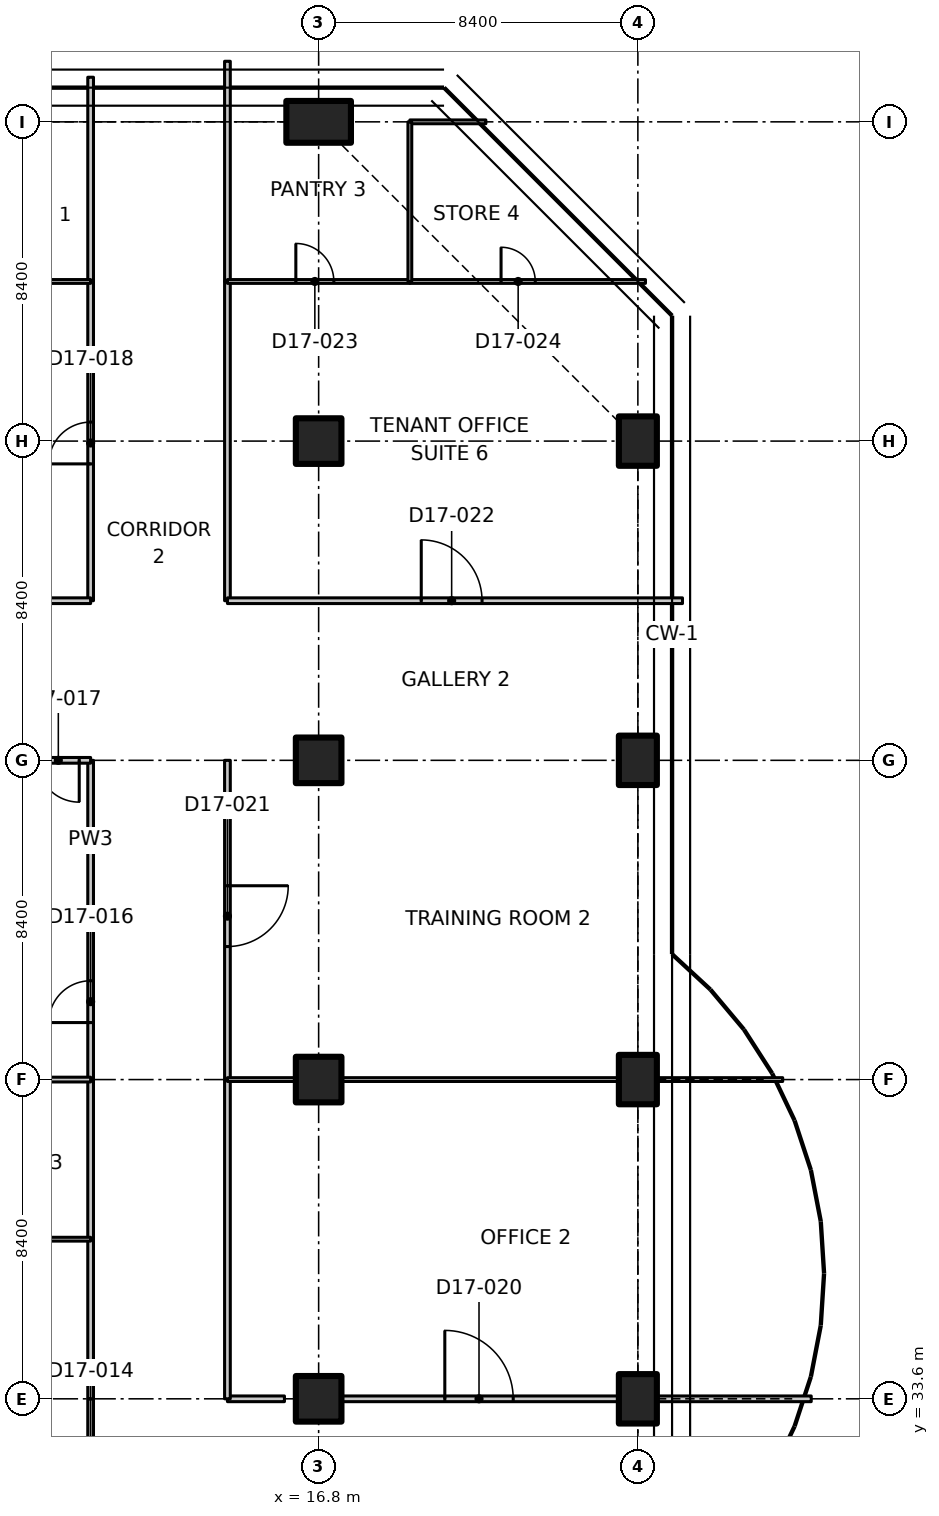
"""IFC4 building model, lengths in metres.
Left out: names, types, materials, properties, quantities, classifications, styles, units other than length and angle.
Written with IfcOpenShell. Run it as: python <this file> out.ifc"""

import sys

from ifc_helpers import new_model, si_unit, direction, frame, frame_2d, origin, origin_2d, place, context, subcontext, project, spatial, polyline, rectangle, outline, extrude, element, fill, save


model = new_model("IFC4")
c1 = context("Model", 3, precision=1e-05, world=origin(), true_north=direction((0.0, 1.0)))
c2 = subcontext(c1, "Body", "Model", "MODEL_VIEW")
j1 = project(units=[si_unit("LENGTHUNIT", "METRE"), si_unit("PLANEANGLEUNIT", "RADIAN")], contexts=[c1])
p1 = place(None, origin())
s1 = spatial("IfcSite", under=j1, at=p1, CompositionType="ELEMENT")
p2 = place(p1, origin())
s2 = spatial("IfcBuilding", under=s1, at=p2, CompositionType="ELEMENT")
p3 = place(p2, frame((0.0, 0.0, 138.5)))
s3 = spatial("IfcBuildingStorey", under=s2, at=p3, CompositionType="ELEMENT", Elevation=138.5)
for number, where, z_axis, x_axis in (
    (1, (16.8, 33.6, 0.0), (0.0, 0.0, 1.0), (1.0, 0.0, 0.0)),
    (2, (16.8, 42.0, 0.0), (0.0, 0.0, 1.0), (1.0, 0.0, 0.0)),
    (3, (16.8, 50.4, 0.0), (0.0, 0.0, 1.0), (1.0, 0.0, 0.0)),
    (4, (16.8, 58.8, 0.0), (0.0, 0.0, 1.0), (1.0, 0.0, 0.0)),
):
    element("IfcColumn", number, at=place(p3, frame(where, z_axis=z_axis, x_axis=x_axis)), inside=s3, PredefinedType="COLUMN", context=c2, shape_type="SweptSolid", body=[
        extrude(rectangle(XDim=1.2, YDim=1.2, at=origin_2d()), origin(), (0.0, 0.0, 1.0), 3.35),
    ])
p4 = place(p3, frame((16.8, 67.2, 0.0), z_axis=(0.0, 0.0, 1.0), x_axis=(0.0, 1.0, 0.0)))
e5 = element("IfcColumn", 5, at=p4, inside=s3, PredefinedType="COLUMN", context=c2, shape_type="SweptSolid", body=[
    extrude(rectangle(XDim=1.1, YDim=1.7, at=origin_2d()), origin(), (0.0, 0.0, 1.0), 3.35),
])
for number, where, z_axis, x_axis in (
    (6, (25.2, 33.6, 0.0), (0.0, 0.0, 1.0), (1.0, 0.0, 0.0)),
    (7, (25.2, 42.0, 0.0), (0.0, 0.0, 1.0), (1.0, 0.0, 0.0)),
    (8, (25.2, 50.4, 0.0), (0.0, 0.0, 1.0), (1.0, 0.0, 0.0)),
    (9, (25.2, 58.8, 0.0), (0.0, 0.0, 1.0), (1.0, 0.0, 0.0)),
):
    element("IfcColumn", number, at=place(p3, frame(where, z_axis=z_axis, x_axis=x_axis)), inside=s3, PredefinedType="COLUMN", context=c2, shape_type="SweptSolid", body=[
        extrude(rectangle(XDim=1.0, YDim=1.3, at=origin_2d()), origin(), (0.0, 0.0, 1.0), 3.35),
    ])
p5 = place(p3, frame((10.8, 29.4, 0.0), z_axis=(0.0, 0.0, 1.0), x_axis=(0.0, 1.0, 0.0)))
e10 = element("IfcWall", 10, at=p5, inside=s3, PredefinedType="PARTITIONING", context=c2, shape_type="SweptSolid", body=[
    extrude(rectangle(XDim=4.2, YDim=0.15, at=frame_2d((2.1, 0.0))), origin(), (0.0, 0.0, 1.0), 3.33),
])
p6 = place(p5, frame((1.2, 0.0, 0.0)))
e11 = element("IfcOpeningElement", 11, at=p6, cuts=e10, PredefinedType="OPENING", context=c2, shape_type="SweptSolid", body=[
    extrude(rectangle(XDim=1.6, YDim=2.1, at=frame_2d((0.8, 1.05))), frame((0.0, 0.085, 0.0), z_axis=(0.0, -1.0, 0.0), x_axis=(1.0, 0.0, 0.0)), (0.0, 0.0, 1.0), 0.17),
])
p7 = place(p3, frame((14.4, 33.6, 0.0), z_axis=(0.0, 0.0, 1.0), x_axis=(1.0, 0.0, 0.0)))
e12 = element("IfcWall", 12, at=p7, inside=s3, PredefinedType="PARTITIONING", context=c2, shape_type="SweptSolid", body=[
    extrude(rectangle(XDim=1.5, YDim=0.15, at=frame_2d((0.75, 0.0))), origin(), (0.0, 0.0, 1.0), 3.33),
])
p8 = place(p3, frame((17.42, 33.6, 0.0), z_axis=(0.0, 0.0, 1.0), x_axis=(1.0, 0.0, 0.0)))
e13 = element("IfcWall", 13, at=p8, inside=s3, PredefinedType="PARTITIONING", context=c2, shape_type="SweptSolid", body=[
    extrude(rectangle(XDim=7.26, YDim=0.15, at=frame_2d((3.63, 0.0))), origin(), (0.0, 0.0, 1.0), 3.33),
])
p9 = place(p8, frame((2.7, 0.0, 0.0)))
e14 = element("IfcOpeningElement", 14, at=p9, cuts=e13, PredefinedType="OPENING", context=c2, shape_type="SweptSolid", body=[
    extrude(rectangle(XDim=1.8, YDim=2.1, at=frame_2d((0.9, 1.05))), frame((0.0, 0.085, 0.0), z_axis=(0.0, -1.0, 0.0), x_axis=(1.0, 0.0, 0.0)), (0.0, 0.0, 1.0), 0.17),
])
p10 = place(p3, frame((25.72, 33.6, 0.0), z_axis=(0.0, 0.0, 1.0), x_axis=(1.0, 0.0, 0.0)))
e15 = element("IfcWall", 15, at=p10, inside=s3, PredefinedType="PARTITIONING", context=c2, shape_type="SweptSolid", body=[
    extrude(rectangle(XDim=4.042, YDim=0.15, at=frame_2d((2.021, 0.0))), origin(), (0.0, 0.0, 1.0), 2.98),
])
for number, where, z_axis, x_axis in (
    (16, (10.8, 33.6, 0.0), (0.0, 0.0, 1.0), (0.0, 1.0, 0.0)),
    (17, (10.8, 37.8, 0.0), (0.0, 0.0, 1.0), (0.0, 1.0, 0.0)),
):
    element("IfcWall", number, at=place(p3, frame(where, z_axis=z_axis, x_axis=x_axis)), inside=s3, PredefinedType="PARTITIONING", context=c2, shape_type="SweptSolid", body=[
        extrude(rectangle(XDim=4.2, YDim=0.15, at=frame_2d((2.1, 0.0))), origin(), (0.0, 0.0, 1.0), 3.33),
    ])
p11 = place(p3, frame((10.8, 42.0, 0.0), z_axis=(0.0, 0.0, 1.0), x_axis=(0.0, 1.0, 0.0)))
e18 = element("IfcWall", 18, at=p11, inside=s3, PredefinedType="PARTITIONING", context=c2, shape_type="SweptSolid", body=[
    extrude(rectangle(XDim=4.2, YDim=0.15, at=frame_2d((2.1, 0.0))), origin(), (0.0, 0.0, 1.0), 3.33),
])
p12 = place(p11, frame((1.5, 0.0, 0.0)))
e19 = element("IfcOpeningElement", 19, at=p12, cuts=e18, PredefinedType="OPENING", context=c2, shape_type="SweptSolid", body=[
    extrude(rectangle(XDim=1.1, YDim=2.1, at=frame_2d((0.55, 1.05))), frame((0.0, 0.085, 0.0), z_axis=(0.0, -1.0, 0.0), x_axis=(1.0, 0.0, 0.0)), (0.0, 0.0, 1.0), 0.17),
])
p13 = place(p3, frame((10.8, 46.2, 0.0), z_axis=(0.0, 0.0, 1.0), x_axis=(0.0, 1.0, 0.0)))
e20 = element("IfcWall", 20, at=p13, inside=s3, PredefinedType="PARTITIONING", context=c2, shape_type="SweptSolid", body=[
    extrude(rectangle(XDim=4.2, YDim=0.15, at=frame_2d((2.1, 0.0))), origin(), (0.0, 0.0, 1.0), 3.33),
])
p14 = place(p3, frame((10.8, 54.6, 0.0), z_axis=(0.0, 0.0, 1.0), x_axis=(0.0, 1.0, 0.0)))
e21 = element("IfcWall", 21, at=p14, inside=s3, PredefinedType="PARTITIONING", context=c2, shape_type="SweptSolid", body=[
    extrude(rectangle(XDim=8.4, YDim=0.15, at=frame_2d((4.2, 0.0))), origin(), (0.0, 0.0, 1.0), 3.33),
])
p15 = place(p14, frame((3.6, 0.0, 0.0)))
e22 = element("IfcOpeningElement", 22, at=p15, cuts=e21, PredefinedType="OPENING", context=c2, shape_type="SweptSolid", body=[
    extrude(rectangle(XDim=1.1, YDim=2.1, at=frame_2d((0.55, 1.05))), frame((0.0, 0.085, 0.0), z_axis=(0.0, -1.0, 0.0), x_axis=(1.0, 0.0, 0.0)), (0.0, 0.0, 1.0), 0.17),
])
p16 = place(p3, frame((10.8, 63.0, 0.0), z_axis=(0.0, 0.0, 1.0), x_axis=(0.0, 1.0, 0.0)))
e23 = element("IfcWall", 23, at=p16, inside=s3, PredefinedType="PARTITIONING", context=c2, shape_type="SweptSolid", body=[
    extrude(outline(polyline([(0.0, 0.0), (5.374, 0.0), (5.374, 3.33), (5.28, 3.33), (4.65, 3.33), (4.648, 2.98), (3.752, 2.98), (3.75, 3.33), (0.0, 3.33), (0.0, 0.0)])), frame((0.0, 0.075, 0.0), z_axis=(0.0, -1.0, 0.0), x_axis=(1.0, 0.0, 0.0)), (0.0, 0.0, 1.0), 0.15),
])
p17 = place(p3, frame((14.4, 42.0, 0.0), z_axis=(0.0, 0.0, 1.0), x_axis=(0.0, -1.0, 0.0)))
e24 = element("IfcWall", 24, at=p17, inside=s3, PredefinedType="PARTITIONING", context=c2, shape_type="SweptSolid", body=[
    extrude(rectangle(XDim=8.4, YDim=0.15, at=frame_2d((4.2, 0.0))), origin(), (0.0, 0.0, 1.0), 3.33),
])
p18 = place(p3, frame((14.4, 50.4, 0.0), z_axis=(0.0, 0.0, 1.0), x_axis=(0.0, -1.0, 0.0)))
e25 = element("IfcWall", 25, at=p18, inside=s3, PredefinedType="PARTITIONING", context=c2, shape_type="SweptSolid", body=[
    extrude(rectangle(XDim=8.4, YDim=0.15, at=frame_2d((4.2, 0.0))), origin(), (0.0, 0.0, 1.0), 3.33),
])
p19 = place(p18, frame((3.3, 0.0, 0.0)))
e26 = element("IfcOpeningElement", 26, at=p19, cuts=e25, PredefinedType="OPENING", context=c2, shape_type="SweptSolid", body=[
    extrude(rectangle(XDim=1.6, YDim=2.1, at=frame_2d((0.8, 1.05))), frame((0.0, 0.085, 0.0), z_axis=(0.0, -1.0, 0.0), x_axis=(1.0, 0.0, 0.0)), (0.0, 0.0, 1.0), 0.17),
])
p20 = place(p3, frame((14.4, 63.0, 0.0), z_axis=(0.0, 0.0, 1.0), x_axis=(0.0, -1.0, 0.0)))
e27 = element("IfcWall", 27, at=p20, inside=s3, PredefinedType="PARTITIONING", context=c2, shape_type="SweptSolid", body=[
    extrude(rectangle(XDim=8.4, YDim=0.15, at=frame_2d((4.2, 0.0))), origin(), (0.0, 0.0, 1.0), 3.33),
])
p21 = place(p3, frame((14.4, 68.794, 0.0), z_axis=(0.0, 0.0, 1.0), x_axis=(0.0, -1.0, 0.0)))
e28 = element("IfcWall", 28, at=p21, inside=s3, PredefinedType="PARTITIONING", context=c2, shape_type="SweptSolid", body=[
    extrude(outline(polyline([(0.0, 0.0), (5.794, 0.0), (5.794, 3.33), (2.044, 3.33), (2.042, 2.98), (1.146, 2.98), (1.144, 3.33), (0.514, 3.33), (0.0, 3.33), (0.0, 0.0)])), frame((0.0, 0.075, 0.0), z_axis=(0.0, -1.0, 0.0), x_axis=(1.0, 0.0, 0.0)), (0.0, 0.0, 1.0), 0.15),
])
p22 = place(p3, frame((10.8, 50.4, 0.0), z_axis=(0.0, 0.0, 1.0), x_axis=(-1.0, 0.0, 0.0)))
e29 = element("IfcWall", 29, at=p22, inside=s3, PredefinedType="PARTITIONING", context=c2, shape_type="SweptSolid", body=[
    extrude(rectangle(XDim=1.88, YDim=0.15, at=frame_2d((0.94, 0.0))), origin(), (0.0, 0.0, 1.0), 3.33),
])
p23 = place(p22, frame((0.3, 0.0, 0.0)))
e30 = element("IfcOpeningElement", 30, at=p23, cuts=e29, PredefinedType="OPENING", context=c2, shape_type="SweptSolid", body=[
    extrude(rectangle(XDim=1.1, YDim=2.1, at=frame_2d((0.55, 1.05))), frame((0.0, 0.085, 0.0), z_axis=(0.0, -1.0, 0.0), x_axis=(1.0, 0.0, 0.0)), (0.0, 0.0, 1.0), 0.17),
])
p24 = place(p3, frame((7.035, 54.6, 0.0), z_axis=(0.0, 0.0, 1.0), x_axis=(1.0, 0.0, 0.0)))
e31 = element("IfcWall", 31, at=p24, inside=s3, PredefinedType="PARTITIONING", context=c2, shape_type="SweptSolid", body=[
    extrude(rectangle(XDim=3.765, YDim=0.15, at=frame_2d((1.883, 0.0))), origin(), (0.0, 0.0, 1.0), 2.98),
])
p25 = place(p3, frame((4.235, 37.8, 0.0), z_axis=(0.0, 0.0, 1.0), x_axis=(1.0, 0.0, 0.0)))
e32 = element("IfcWall", 32, at=p25, inside=s3, PredefinedType="PARTITIONING", context=c2, shape_type="SweptSolid", body=[
    extrude(outline(polyline([(0.0, 0.0), (6.565, 0.0), (6.565, 3.33), (1.815, 3.33), (1.813, 2.98), (0.917, 2.98), (0.915, 3.33), (0.265, 3.33), (0.0, 3.33), (0.0, 0.0)])), frame((0.0, 0.05, 0.0), z_axis=(0.0, -1.0, 0.0), x_axis=(1.0, 0.0, 0.0)), (0.0, 0.0, 1.0), 0.1),
])
p26 = place(p25, frame((2.865, 0.0, 0.0)))
e33 = element("IfcOpeningElement", 33, at=p26, cuts=e32, PredefinedType="OPENING", context=c2, shape_type="SweptSolid", body=[
    extrude(rectangle(XDim=1.0, YDim=2.1, at=frame_2d((0.5, 1.05))), frame((0.0, 0.06, 0.0), z_axis=(0.0, -1.0, 0.0), x_axis=(1.0, 0.0, 0.0)), (0.0, 0.0, 1.0), 0.12),
])
p27 = place(p3, frame((9.02, 42.0, 0.0), z_axis=(0.0, 0.0, 1.0), x_axis=(1.0, 0.0, 0.0)))
e34 = element("IfcWall", 34, at=p27, inside=s3, PredefinedType="PARTITIONING", context=c2, shape_type="SweptSolid", body=[
    extrude(rectangle(XDim=1.78, YDim=0.125, at=frame_2d((0.89, 0.0))), origin(), (0.0, 0.0, 1.0), 3.33),
])
p28 = place(p3, frame((4.235, 46.2, 0.0), z_axis=(0.0, 0.0, 1.0), x_axis=(1.0, 0.0, 0.0)))
e35 = element("IfcWall", 35, at=p28, inside=s3, PredefinedType="PARTITIONING", context=c2, shape_type="SweptSolid", body=[
    extrude(outline(polyline([(0.0, 0.0), (6.565, 0.0), (6.565, 3.33), (1.815, 3.33), (1.813, 2.98), (0.917, 2.98), (0.915, 3.33), (0.265, 3.33), (0.0, 3.33), (0.0, 0.0)])), frame((0.0, 0.05, 0.0), z_axis=(0.0, -1.0, 0.0), x_axis=(1.0, 0.0, 0.0)), (0.0, 0.0, 1.0), 0.1),
])
p29 = place(p3, frame((7.035, 63.0, 0.0), z_axis=(0.0, 0.0, 1.0), x_axis=(1.0, 0.0, 0.0)))
e36 = element("IfcWall", 36, at=p29, inside=s3, PredefinedType="PARTITIONING", context=c2, shape_type="SweptSolid", body=[
    extrude(rectangle(XDim=3.765, YDim=0.1, at=frame_2d((1.883, 0.0))), origin(), (0.0, 0.0, 1.0), 2.98),
])
p30 = place(p29, frame((1.665, 0.0, 0.0)))
e37 = element("IfcOpeningElement", 37, at=p30, cuts=e36, PredefinedType="OPENING", context=c2, shape_type="SweptSolid", body=[
    extrude(rectangle(XDim=0.9, YDim=2.1, at=frame_2d((0.45, 1.05))), frame((0.0, 0.06, 0.0), z_axis=(0.0, -1.0, 0.0), x_axis=(1.0, 0.0, 0.0)), (0.0, 0.0, 1.0), 0.12),
])
p31 = place(p3, frame((14.4, 54.6, 0.0), z_axis=(0.0, 0.0, 1.0), x_axis=(1.0, 0.0, 0.0)))
e38 = element("IfcWall", 38, at=p31, inside=s3, PredefinedType="PARTITIONING", context=c2, shape_type="SweptSolid", body=[
    extrude(outline(polyline([(0.0, 0.0), (11.974, 0.0), (11.974, 3.33), (11.9, 3.33), (11.25, 3.33), (11.248, 2.98), (10.352, 2.98), (10.35, 3.33), (0.0, 3.33), (0.0, 0.0)])), frame((0.0, 0.075, 0.0), z_axis=(0.0, -1.0, 0.0), x_axis=(1.0, 0.0, 0.0)), (0.0, 0.0, 1.0), 0.15),
])
p32 = place(p31, frame((5.1, 0.0, 0.0)))
e39 = element("IfcOpeningElement", 39, at=p32, cuts=e38, PredefinedType="OPENING", context=c2, shape_type="SweptSolid", body=[
    extrude(rectangle(XDim=1.6, YDim=2.1, at=frame_2d((0.8, 1.05))), frame((0.0, 0.085, 0.0), z_axis=(0.0, -1.0, 0.0), x_axis=(1.0, 0.0, 0.0)), (0.0, 0.0, 1.0), 0.17),
])
p33 = place(p3, frame((14.4, 42.0, 0.0), z_axis=(0.0, 0.0, 1.0), x_axis=(1.0, 0.0, 0.0)))
e40 = element("IfcWall", 40, at=p33, inside=s3, PredefinedType="PARTITIONING", context=c2, shape_type="SweptSolid", body=[
    extrude(rectangle(XDim=1.78, YDim=0.1, at=frame_2d((0.89, 0.0))), origin(), (0.0, 0.0, 1.0), 3.33),
])
p34 = place(p3, frame((17.42, 42.0, 0.0), z_axis=(0.0, 0.0, 1.0), x_axis=(1.0, 0.0, 0.0)))
e41 = element("IfcWall", 41, at=p34, inside=s3, PredefinedType="PARTITIONING", context=c2, shape_type="SweptSolid", body=[
    extrude(rectangle(XDim=7.26, YDim=0.1, at=frame_2d((3.63, 0.0))), origin(), (0.0, 0.0, 1.0), 3.33),
])
p35 = place(p3, frame((25.72, 42.0, 0.0), z_axis=(0.0, 0.0, 1.0), x_axis=(1.0, 0.0, 0.0)))
e42 = element("IfcWall", 42, at=p35, inside=s3, PredefinedType="PARTITIONING", context=c2, shape_type="SweptSolid", body=[
    extrude(rectangle(XDim=3.292, YDim=0.1, at=frame_2d((1.646, 0.0))), origin(), (0.0, 0.0, 1.0), 2.98),
])
p36 = place(p3, frame((14.4, 63.0, 0.0), z_axis=(0.0, 0.0, 1.0), x_axis=(1.0, 0.0, 0.0)))
e43 = element("IfcWall", 43, at=p36, inside=s3, PredefinedType="PARTITIONING", context=c2, shape_type="SweptSolid", body=[
    extrude(rectangle(XDim=4.8, YDim=0.1, at=frame_2d((2.4, 0.0))), origin(), (0.0, 0.0, 1.0), 3.33),
])
p37 = place(p36, frame((1.8, 0.0, 0.0)))
e44 = element("IfcOpeningElement", 44, at=p37, cuts=e43, PredefinedType="OPENING", context=c2, shape_type="SweptSolid", body=[
    extrude(rectangle(XDim=1.0, YDim=2.1, at=frame_2d((0.5, 1.05))), frame((0.0, 0.06, 0.0), z_axis=(0.0, -1.0, 0.0), x_axis=(1.0, 0.0, 0.0)), (0.0, 0.0, 1.0), 0.12),
])
p38 = place(p3, frame((19.2, 63.0, 0.0), z_axis=(0.0, 0.0, 1.0), x_axis=(1.0, 0.0, 0.0)))
e45 = element("IfcWall", 45, at=p38, inside=s3, PredefinedType="PARTITIONING", context=c2, shape_type="SweptSolid", body=[
    extrude(outline(polyline([(0.0, 0.0), (6.2, 0.0), (6.2, 3.33), (2.466, 3.33), (2.464, 2.98), (1.136, 2.98), (1.134, 3.33), (0.0, 3.33), (0.0, 0.0)])), frame((0.0, 0.05, 0.0), z_axis=(0.0, -1.0, 0.0), x_axis=(1.0, 0.0, 0.0)), (0.0, 0.0, 1.0), 0.1),
])
p39 = place(p38, frame((2.4, 0.0, 0.0)))
e46 = element("IfcOpeningElement", 46, at=p39, cuts=e45, PredefinedType="OPENING", context=c2, shape_type="SweptSolid", body=[
    extrude(rectangle(XDim=0.9, YDim=2.1, at=frame_2d((0.45, 1.05))), frame((0.0, 0.06, 0.0), z_axis=(0.0, -1.0, 0.0), x_axis=(1.0, 0.0, 0.0)), (0.0, 0.0, 1.0), 0.12),
])
p40 = place(p3, frame((21.2, 67.2, 0.0), z_axis=(0.0, 0.0, 1.0), x_axis=(-1.0, 0.0, 0.0)))
e47 = element("IfcWall", 47, at=p40, inside=s3, PredefinedType="PARTITIONING", context=c2, shape_type="SweptSolid", body=[
    extrude(rectangle(XDim=2.0, YDim=0.1, at=frame_2d((1.0, 0.0))), origin(), (0.0, 0.0, 1.0), 3.33),
])
p41 = place(p3, frame((19.2, 67.2, 0.0), z_axis=(0.0, 0.0, 1.0), x_axis=(0.0, -1.0, 0.0)))
e48 = element("IfcWall", 48, at=p41, inside=s3, PredefinedType="PARTITIONING", context=c2, shape_type="SweptSolid", body=[
    extrude(rectangle(XDim=4.2, YDim=0.1, at=frame_2d((2.1, 0.0))), origin(), (0.0, 0.0, 1.0), 2.98),
])
p42 = place(p12, origin())
e49 = element("IfcDoor", 49, at=p42, inside=s3, OperationType="SINGLE_SWING_LEFT", PredefinedType="DOOR", context=c2, shape_type="SweptSolid", body=[
    extrude(rectangle(XDim=1.1, YDim=2.1, at=frame_2d((0.55, 1.05))), frame((0.0, 0.025, 0.0), z_axis=(0.0, -1.0, 0.0), x_axis=(1.0, 0.0, 0.0)), (0.0, 0.0, 1.0), 0.05),
])
fill(e19, e49)
p43 = place(p23, origin())
e50 = element("IfcDoor", 50, at=p43, inside=s3, OperationType="SINGLE_SWING_LEFT", PredefinedType="DOOR", context=c2, shape_type="SweptSolid", body=[
    extrude(rectangle(XDim=1.1, YDim=2.1, at=frame_2d((0.55, 1.05))), frame((0.0, 0.025, 0.0), z_axis=(0.0, -1.0, 0.0), x_axis=(1.0, 0.0, 0.0)), (0.0, 0.0, 1.0), 0.05),
])
fill(e30, e50)
p44 = place(p15, origin())
e51 = element("IfcDoor", 51, at=p44, inside=s3, OperationType="SINGLE_SWING_LEFT", PredefinedType="DOOR", context=c2, shape_type="SweptSolid", body=[
    extrude(rectangle(XDim=1.1, YDim=2.1, at=frame_2d((0.55, 1.05))), frame((0.0, 0.025, 0.0), z_axis=(0.0, -1.0, 0.0), x_axis=(1.0, 0.0, 0.0)), (0.0, 0.0, 1.0), 0.05),
])
fill(e22, e51)
p45 = place(p9, origin())
e52 = element("IfcDoor", 52, at=p45, inside=s3, OperationType="DOUBLE_DOOR_SINGLE_SWING", PredefinedType="DOOR", context=c2, shape_type="SweptSolid", body=[
    extrude(rectangle(XDim=1.8, YDim=2.1, at=frame_2d((0.9, 1.05))), frame((0.0, 0.025, 0.0), z_axis=(0.0, -1.0, 0.0), x_axis=(1.0, 0.0, 0.0)), (0.0, 0.0, 1.0), 0.05),
])
fill(e14, e52)
p46 = place(p19, origin())
e53 = element("IfcDoor", 53, at=p46, inside=s3, OperationType="DOUBLE_DOOR_SINGLE_SWING", PredefinedType="DOOR", context=c2, shape_type="SweptSolid", body=[
    extrude(rectangle(XDim=1.6, YDim=2.1, at=frame_2d((0.8, 1.05))), frame((0.0, 0.025, 0.0), z_axis=(0.0, -1.0, 0.0), x_axis=(1.0, 0.0, 0.0)), (0.0, 0.0, 1.0), 0.05),
])
fill(e26, e53)
p47 = place(p32, origin())
e54 = element("IfcDoor", 54, at=p47, inside=s3, OperationType="DOUBLE_DOOR_SINGLE_SWING", PredefinedType="DOOR", context=c2, shape_type="SweptSolid", body=[
    extrude(rectangle(XDim=1.6, YDim=2.1, at=frame_2d((0.8, 1.05))), frame((0.0, 0.025, 0.0), z_axis=(0.0, -1.0, 0.0), x_axis=(1.0, 0.0, 0.0)), (0.0, 0.0, 1.0), 0.05),
])
fill(e39, e54)
p48 = place(p37, origin())
e55 = element("IfcDoor", 55, at=p48, inside=s3, OperationType="SINGLE_SWING_LEFT", PredefinedType="DOOR", context=c2, shape_type="SweptSolid", body=[
    extrude(rectangle(XDim=1.0, YDim=2.1, at=frame_2d((0.5, 1.05))), frame((0.0, 0.025, 0.0), z_axis=(0.0, -1.0, 0.0), x_axis=(1.0, 0.0, 0.0)), (0.0, 0.0, 1.0), 0.05),
])
fill(e44, e55)
p49 = place(p39, origin())
e56 = element("IfcDoor", 56, at=p49, inside=s3, OperationType="SINGLE_SWING_LEFT", PredefinedType="DOOR", context=c2, shape_type="SweptSolid", body=[
    extrude(rectangle(XDim=0.9, YDim=2.1, at=frame_2d((0.45, 1.05))), frame((0.0, 0.025, 0.0), z_axis=(0.0, -1.0, 0.0), x_axis=(1.0, 0.0, 0.0)), (0.0, 0.0, 1.0), 0.05),
])
fill(e46, e56)
save(model, sys.argv[1])
